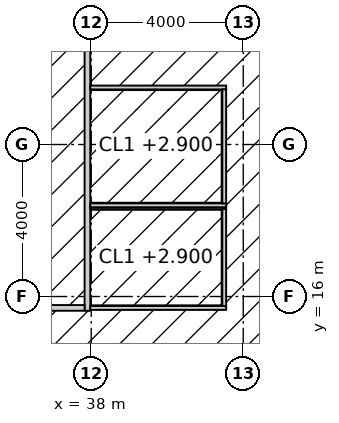
"""IFC4 building model, lengths in metres.
Left out: names, types, materials, properties, quantities, classifications, styles, units other than length and angle.
Written with IfcOpenShell. Run it as: python <this file> out.ifc"""

import sys

from ifc_helpers import new_model, si_unit, direction, frame, frame_2d, origin, place, context, subcontext, project, spatial, rectangle, extrude, element, fill, save


model = new_model("IFC4")
c1 = context("Model", 3, precision=1e-05, world=origin(), true_north=direction((0.0, 1.0)))
c2 = subcontext(c1, "Body", "Model", "MODEL_VIEW")
j1 = project(units=[si_unit("LENGTHUNIT", "METRE"), si_unit("PLANEANGLEUNIT", "RADIAN")], contexts=[c1])
p1 = place(None, origin())
s1 = spatial("IfcSite", under=j1, at=p1, CompositionType="ELEMENT")
p2 = place(p1, origin())
s2 = spatial("IfcBuilding", under=s1, at=p2, CompositionType="ELEMENT")
p3 = place(p2, frame((0.0, 0.0, 179.8)))
s3 = spatial("IfcBuildingStorey", under=s2, at=p3, CompositionType="ELEMENT", Elevation=179.8)
p4 = place(p3, frame((37.9, 15.625, 0.0), z_axis=(0.0, 0.0, 1.0), x_axis=(0.0, 1.0, 0.0)))
e1 = element("IfcWall", 1, at=p4, inside=s3, PredefinedType="PARTITIONING", context=c2, shape_type="SweptSolid", body=[
    extrude(rectangle(XDim=22.75, YDim=0.15, at=frame_2d((11.375, 0.0))), origin(), (0.0, 0.0, 1.0), 2.95),
])
p5 = place(p4, frame((10.475, 0.0, 0.0)))
e2 = element("IfcOpeningElement", 2, at=p5, cuts=e1, PredefinedType="OPENING", context=c2, shape_type="SweptSolid", body=[
    extrude(rectangle(XDim=1.8, YDim=2.4, at=frame_2d((0.9, 1.2))), frame((0.0, 0.085, 0.0), z_axis=(0.0, -1.0, 0.0), x_axis=(1.0, 0.0, 0.0)), (0.0, 0.0, 1.0), 0.17),
])
p6 = place(p3, frame((15.175, 15.7, 0.0), z_axis=(0.0, 0.0, 1.0), x_axis=(1.0, 0.0, 0.0)))
e3 = element("IfcWall", 3, at=p6, inside=s3, PredefinedType="PARTITIONING", context=c2, shape_type="SweptSolid", body=[
    extrude(rectangle(XDim=22.65, YDim=0.15, at=frame_2d((11.325, 0.0))), origin(), (0.0, 0.0, 1.0), 3.85),
])
for number, where, z_axis, x_axis in (
    (4, (37.975, 15.7, 0.0), (0.0, 0.0, 1.0), (1.0, 0.0, 0.0)),
    (5, (37.975, 18.35, 0.0), (0.0, 0.0, 1.0), (1.0, 0.0, 0.0)),
    (6, (37.975, 18.4, 0.0), (0.0, 0.0, 1.0), (1.0, 0.0, 0.0)),
    (7, (37.975, 21.5, 0.0), (0.0, 0.0, 1.0), (1.0, 0.0, 0.0)),
):
    element("IfcWall", number, at=place(p3, frame(where, z_axis=z_axis, x_axis=x_axis)), inside=s3, PredefinedType="PARTITIONING", context=c2, shape_type="SweptSolid", body=[
        extrude(rectangle(XDim=3.575, YDim=0.1, at=frame_2d((1.788, 0.0))), origin(), (0.0, 0.0, 1.0), 3.85),
    ])
p7 = place(p3, frame((41.5, 15.75, 0.0), z_axis=(0.0, 0.0, 1.0), x_axis=(0.0, 1.0, 0.0)))
e8 = element("IfcWall", 8, at=p7, inside=s3, PredefinedType="PARTITIONING", context=c2, shape_type="SweptSolid", body=[
    extrude(rectangle(XDim=2.55, YDim=0.1, at=frame_2d((1.275, 0.0))), origin(), (0.0, 0.0, 1.0), 3.85),
])
p8 = place(p7, frame((0.775, 0.0, 0.0)))
e9 = element("IfcOpeningElement", 9, at=p8, cuts=e8, PredefinedType="OPENING", context=c2, shape_type="SweptSolid", body=[
    extrude(rectangle(XDim=1.0, YDim=2.2, at=frame_2d((0.5, 1.1))), frame((0.0, 0.06, 0.0), z_axis=(0.0, -1.0, 0.0), x_axis=(1.0, 0.0, 0.0)), (0.0, 0.0, 1.0), 0.12),
])
p9 = place(p3, frame((41.5, 18.45, 0.0), z_axis=(0.0, 0.0, 1.0), x_axis=(0.0, 1.0, 0.0)))
e10 = element("IfcWall", 10, at=p9, inside=s3, PredefinedType="PARTITIONING", context=c2, shape_type="SweptSolid", body=[
    extrude(rectangle(XDim=3.0, YDim=0.1, at=frame_2d((1.5, 0.0))), origin(), (0.0, 0.0, 1.0), 3.85),
])
p10 = place(p9, frame((1.0, 0.0, 0.0)))
e11 = element("IfcOpeningElement", 11, at=p10, cuts=e10, PredefinedType="OPENING", context=c2, shape_type="SweptSolid", body=[
    extrude(rectangle(XDim=1.0, YDim=2.2, at=frame_2d((0.5, 1.1))), frame((0.0, 0.06, 0.0), z_axis=(0.0, -1.0, 0.0), x_axis=(1.0, 0.0, 0.0)), (0.0, 0.0, 1.0), 0.12),
])
p11 = place(p8, origin())
e12 = element("IfcDoor", 12, at=p11, inside=s3, OperationType="SINGLE_SWING_LEFT", PredefinedType="DOOR", context=c2, shape_type="SweptSolid", body=[
    extrude(rectangle(XDim=1.0, YDim=2.2, at=frame_2d((0.5, 1.1))), frame((0.0, 0.025, 0.0), z_axis=(0.0, -1.0, 0.0), x_axis=(1.0, 0.0, 0.0)), (0.0, 0.0, 1.0), 0.05),
])
fill(e9, e12)
p12 = place(p10, origin())
e13 = element("IfcDoor", 13, at=p12, inside=s3, OperationType="SINGLE_SWING_LEFT", PredefinedType="DOOR", context=c2, shape_type="SweptSolid", body=[
    extrude(rectangle(XDim=1.0, YDim=2.2, at=frame_2d((0.5, 1.1))), frame((0.0, 0.025, 0.0), z_axis=(0.0, -1.0, 0.0), x_axis=(1.0, 0.0, 0.0)), (0.0, 0.0, 1.0), 0.05),
])
fill(e11, e13)
save(model, sys.argv[1])
